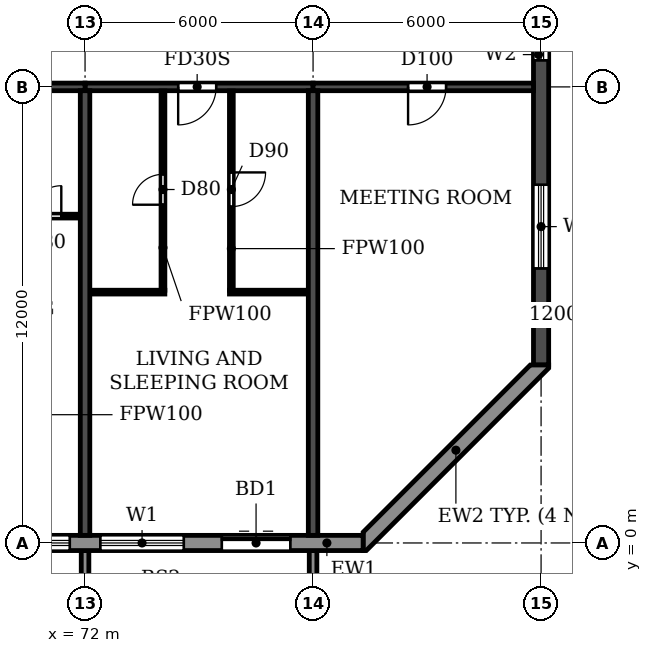
"""IFC4 building model, lengths in metres.
Left out: names, types, materials, properties, quantities, classifications, styles, units other than length and angle.
Written with IfcOpenShell. Run it as: python <this file> out.ifc"""

import sys

from ifc_helpers import new_model, si_unit, direction, frame, frame_2d, origin, place, context, subcontext, project, spatial, polyline, rectangle, outline, extrude, source, transform, mapped, element, fill, save


model = new_model("IFC4")
c1 = context("Model", 3, precision=1e-05, world=origin(), true_north=direction((0.0, 1.0)))
c2 = subcontext(c1, "Body", "Model", "MODEL_VIEW")
j1 = project(units=[si_unit("LENGTHUNIT", "METRE"), si_unit("PLANEANGLEUNIT", "RADIAN")], contexts=[c1])
p1 = place(None, origin())
s1 = spatial("IfcSite", under=j1, at=p1, CompositionType="ELEMENT")
p2 = place(p1, origin())
s2 = spatial("IfcBuilding", under=s1, at=p2, CompositionType="ELEMENT")
p3 = place(p2, frame((0.0, 0.0, 251.1)))
s3 = spatial("IfcBuildingStorey", under=s2, at=p3, CompositionType="ELEMENT", Elevation=251.1)
for number, where, z_axis, x_axis in (
    (1, (72.0, 0.2, 0.0), (0.0, 0.0, 1.0), (0.0, 1.0, 0.0)),
    (2, (78.0, 0.2, 0.0), (0.0, 0.0, 1.0), (0.0, 1.0, 0.0)),
):
    element("IfcWall", number, at=place(p3, frame(where, z_axis=z_axis, x_axis=x_axis)), inside=s3, PredefinedType="SHEAR", context=c2, shape_type="SweptSolid", body=[
        extrude(rectangle(XDim=11.7, YDim=0.25, at=frame_2d((5.85, 0.0))), origin(), (0.0, 0.0, 1.0), 3.08),
    ])
p4 = place(p3, frame((84.0, 4.683, 0.0), z_axis=(0.0, 0.0, 1.0), x_axis=(0.0, 1.0, 0.0)))
e3 = element("IfcWall", 3, at=p4, inside=s3, PredefinedType="SHEAR", context=c2, shape_type="SweptSolid", body=[
    extrude(rectangle(XDim=31.834, YDim=0.4, at=frame_2d((15.917, 0.0))), origin(), (0.0, 0.0, 1.0), 3.08),
])
p5 = place(p4, frame((23.817, 0.0, 0.9)))
e4 = element("IfcOpeningElement", 4, at=p5, cuts=e3, PredefinedType="OPENING", context=c2, shape_type="SweptSolid", body=[
    extrude(rectangle(XDim=1.2, YDim=1.5, at=frame_2d((0.6, 0.75))), frame((0.0, 0.21, 0.0), z_axis=(0.0, -1.0, 0.0), x_axis=(1.0, 0.0, 0.0)), (0.0, 0.0, 1.0), 0.42),
])
p6 = place(p4, frame((8.017, 0.0, 0.9)))
e5 = element("IfcOpeningElement", 5, at=p6, cuts=e3, PredefinedType="OPENING", context=c2, shape_type="SweptSolid", body=[
    extrude(rectangle(XDim=1.2, YDim=1.5, at=frame_2d((0.6, 0.75))), frame((0.0, 0.21, 0.0), z_axis=(0.0, -1.0, 0.0), x_axis=(1.0, 0.0, 0.0)), (0.0, 0.0, 1.0), 0.42),
])
p7 = place(p4, frame((27.694, 0.0, 0.6)))
e6 = element("IfcOpeningElement", 6, at=p7, cuts=e3, PredefinedType="OPENING", context=c2, shape_type="SweptSolid", body=[
    extrude(rectangle(XDim=2.2, YDim=1.8, at=frame_2d((1.1, 0.9))), frame((0.0, 0.21, 0.0), z_axis=(0.0, -1.0, 0.0), x_axis=(1.0, 0.0, 0.0)), (0.0, 0.0, 1.0), 0.42),
])
p8 = place(p4, frame((2.541, 0.0, 0.6)))
e7 = element("IfcOpeningElement", 7, at=p8, cuts=e3, PredefinedType="OPENING", context=c2, shape_type="SweptSolid", body=[
    extrude(rectangle(XDim=2.2, YDim=1.8, at=frame_2d((1.1, 0.9))), frame((0.0, 0.21, 0.0), z_axis=(0.0, -1.0, 0.0), x_axis=(1.0, 0.0, 0.0)), (0.0, 0.0, 1.0), 0.42),
])
p9 = place(p4, frame((15.917, 0.0, 0.9)))
e8 = element("IfcOpeningElement", 8, at=p9, cuts=e3, PredefinedType="OPENING", context=c2, shape_type="SweptSolid", body=[
    extrude(rectangle(XDim=1.2, YDim=1.5, at=frame_2d((0.6, 0.75))), frame((0.0, 0.21, 0.0), z_axis=(0.0, -1.0, 0.0), x_axis=(1.0, 0.0, 0.0)), (0.0, 0.0, 1.0), 0.42),
])
p10 = place(p3, frame((66.0, 12.0, 0.0), z_axis=(0.0, 0.0, 1.0), x_axis=(1.0, 0.0, 0.0)))
e9 = element("IfcWall", 9, at=p10, inside=s3, PredefinedType="SHEAR", context=c2, shape_type="SweptSolid", body=[
    extrude(rectangle(XDim=6.0, YDim=0.2, at=frame_2d((3.0, 0.0))), origin(), (0.0, 0.0, 1.0), 2.48),
])
p11 = place(p10, frame((2.55, 0.0, 0.0)))
e10 = element("IfcOpeningElement", 10, at=p11, cuts=e9, PredefinedType="OPENING", context=c2, shape_type="SweptSolid", body=[
    extrude(rectangle(XDim=1.0, YDim=2.1, at=frame_2d((0.5, 1.05))), frame((0.0, 0.11, 0.0), z_axis=(0.0, -1.0, 0.0), x_axis=(1.0, 0.0, 0.0)), (0.0, 0.0, 1.0), 0.22),
])
p12 = place(p3, frame((72.0, 12.0, 0.0), z_axis=(0.0, 0.0, 1.0), x_axis=(1.0, 0.0, 0.0)))
e11 = element("IfcWall", 11, at=p12, inside=s3, PredefinedType="SHEAR", context=c2, shape_type="SweptSolid", body=[
    extrude(rectangle(XDim=6.0, YDim=0.2, at=frame_2d((3.0, 0.0))), origin(), (0.0, 0.0, 1.0), 2.48),
])
p13 = place(p12, frame((2.45, 0.0, 0.0)))
e12 = element("IfcOpeningElement", 12, at=p13, cuts=e11, PredefinedType="OPENING", context=c2, shape_type="SweptSolid", body=[
    extrude(rectangle(XDim=1.0, YDim=2.1, at=frame_2d((0.5, 1.05))), frame((0.0, 0.11, 0.0), z_axis=(0.0, -1.0, 0.0), x_axis=(1.0, 0.0, 0.0)), (0.0, 0.0, 1.0), 0.22),
])
p14 = place(p3, frame((78.0, 12.0, 0.0), z_axis=(0.0, 0.0, 1.0), x_axis=(1.0, 0.0, 0.0)))
e13 = element("IfcWall", 13, at=p14, inside=s3, PredefinedType="SHEAR", context=c2, shape_type="SweptSolid", body=[
    extrude(rectangle(XDim=5.8, YDim=0.2, at=frame_2d((2.9, 0.0))), origin(), (0.0, 0.0, 1.0), 2.48),
])
p15 = place(p14, frame((2.5, 0.0, 0.0)))
e14 = element("IfcOpeningElement", 14, at=p15, cuts=e13, PredefinedType="OPENING", context=c2, shape_type="SweptSolid", body=[
    extrude(rectangle(XDim=1.0, YDim=2.1, at=frame_2d((0.5, 1.05))), frame((0.0, 0.11, 0.0), z_axis=(0.0, -1.0, 0.0), x_axis=(1.0, 0.0, 0.0)), (0.0, 0.0, 1.0), 0.22),
])
p16 = place(p3, frame((22.683, 0.0, 0.0), z_axis=(0.0, 0.0, 1.0), x_axis=(1.0, 0.0, 0.0)))
e15 = element("IfcWall", 15, at=p16, inside=s3, PredefinedType="STANDARD", context=c2, shape_type="SweptSolid", body=[
    extrude(rectangle(XDim=56.634, YDim=0.4, at=frame_2d((28.317, 0.0))), origin(), (0.0, 0.0, 1.0), 3.08),
])
p17 = place(p16, frame((1.717, 0.0, 0.9)))
e16 = element("IfcOpeningElement", 16, at=p17, cuts=e15, PredefinedType="OPENING", context=c2, shape_type="SweptSolid", body=[
    extrude(rectangle(XDim=2.2, YDim=1.5, at=frame_2d((1.1, 0.75))), frame((0.0, 0.21, 0.0), z_axis=(0.0, -1.0, 0.0), x_axis=(1.0, 0.0, 0.0)), (0.0, 0.0, 1.0), 0.42),
])
p18 = place(p16, frame((4.917, 0.0, 0.0)))
e17 = element("IfcOpeningElement", 17, at=p18, cuts=e15, PredefinedType="OPENING", context=c2, shape_type="SweptSolid", body=[
    extrude(rectangle(XDim=1.8, YDim=2.4, at=frame_2d((0.9, 1.2))), frame((0.0, 0.21, 0.0), z_axis=(0.0, -1.0, 0.0), x_axis=(1.0, 0.0, 0.0)), (0.0, 0.0, 1.0), 0.42),
])
p19 = place(p16, frame((7.717, 0.0, 0.9)))
e18 = element("IfcOpeningElement", 18, at=p19, cuts=e15, PredefinedType="OPENING", context=c2, shape_type="SweptSolid", body=[
    extrude(rectangle(XDim=2.2, YDim=1.5, at=frame_2d((1.1, 0.75))), frame((0.0, 0.21, 0.0), z_axis=(0.0, -1.0, 0.0), x_axis=(1.0, 0.0, 0.0)), (0.0, 0.0, 1.0), 0.42),
])
p20 = place(p16, frame((10.717, 0.0, 0.9)))
e19 = element("IfcOpeningElement", 19, at=p20, cuts=e15, PredefinedType="OPENING", context=c2, shape_type="SweptSolid", body=[
    extrude(rectangle(XDim=2.2, YDim=1.5, at=frame_2d((1.1, 0.75))), frame((0.0, 0.21, 0.0), z_axis=(0.0, -1.0, 0.0), x_axis=(1.0, 0.0, 0.0)), (0.0, 0.0, 1.0), 0.42),
])
p21 = place(p16, frame((13.717, 0.0, 0.9)))
e20 = element("IfcOpeningElement", 20, at=p21, cuts=e15, PredefinedType="OPENING", context=c2, shape_type="SweptSolid", body=[
    extrude(rectangle(XDim=2.2, YDim=1.5, at=frame_2d((1.1, 0.75))), frame((0.0, 0.21, 0.0), z_axis=(0.0, -1.0, 0.0), x_axis=(1.0, 0.0, 0.0)), (0.0, 0.0, 1.0), 0.42),
])
p22 = place(p16, frame((16.917, 0.0, 0.0)))
e21 = element("IfcOpeningElement", 21, at=p22, cuts=e15, PredefinedType="OPENING", context=c2, shape_type="SweptSolid", body=[
    extrude(rectangle(XDim=1.8, YDim=2.4, at=frame_2d((0.9, 1.2))), frame((0.0, 0.21, 0.0), z_axis=(0.0, -1.0, 0.0), x_axis=(1.0, 0.0, 0.0)), (0.0, 0.0, 1.0), 0.42),
])
p23 = place(p16, frame((19.717, 0.0, 0.9)))
e22 = element("IfcOpeningElement", 22, at=p23, cuts=e15, PredefinedType="OPENING", context=c2, shape_type="SweptSolid", body=[
    extrude(rectangle(XDim=2.2, YDim=1.5, at=frame_2d((1.1, 0.75))), frame((0.0, 0.21, 0.0), z_axis=(0.0, -1.0, 0.0), x_axis=(1.0, 0.0, 0.0)), (0.0, 0.0, 1.0), 0.42),
])
p24 = place(p16, frame((22.717, 0.0, 0.9)))
e23 = element("IfcOpeningElement", 23, at=p24, cuts=e15, PredefinedType="OPENING", context=c2, shape_type="SweptSolid", body=[
    extrude(rectangle(XDim=2.2, YDim=1.5, at=frame_2d((1.1, 0.75))), frame((0.0, 0.21, 0.0), z_axis=(0.0, -1.0, 0.0), x_axis=(1.0, 0.0, 0.0)), (0.0, 0.0, 1.0), 0.42),
])
p25 = place(p16, frame((25.717, 0.0, 0.9)))
e24 = element("IfcOpeningElement", 24, at=p25, cuts=e15, PredefinedType="OPENING", context=c2, shape_type="SweptSolid", body=[
    extrude(rectangle(XDim=2.2, YDim=1.5, at=frame_2d((1.1, 0.75))), frame((0.0, 0.21, 0.0), z_axis=(0.0, -1.0, 0.0), x_axis=(1.0, 0.0, 0.0)), (0.0, 0.0, 1.0), 0.42),
])
p26 = place(p16, frame((28.917, 0.0, 0.0)))
e25 = element("IfcOpeningElement", 25, at=p26, cuts=e15, PredefinedType="OPENING", context=c2, shape_type="SweptSolid", body=[
    extrude(rectangle(XDim=1.8, YDim=2.4, at=frame_2d((0.9, 1.2))), frame((0.0, 0.21, 0.0), z_axis=(0.0, -1.0, 0.0), x_axis=(1.0, 0.0, 0.0)), (0.0, 0.0, 1.0), 0.42),
])
p27 = place(p16, frame((31.717, 0.0, 0.9)))
e26 = element("IfcOpeningElement", 26, at=p27, cuts=e15, PredefinedType="OPENING", context=c2, shape_type="SweptSolid", body=[
    extrude(rectangle(XDim=2.2, YDim=1.5, at=frame_2d((1.1, 0.75))), frame((0.0, 0.21, 0.0), z_axis=(0.0, -1.0, 0.0), x_axis=(1.0, 0.0, 0.0)), (0.0, 0.0, 1.0), 0.42),
])
p28 = place(p16, frame((34.717, 0.0, 0.9)))
e27 = element("IfcOpeningElement", 27, at=p28, cuts=e15, PredefinedType="OPENING", context=c2, shape_type="SweptSolid", body=[
    extrude(rectangle(XDim=2.2, YDim=1.5, at=frame_2d((1.1, 0.75))), frame((0.0, 0.21, 0.0), z_axis=(0.0, -1.0, 0.0), x_axis=(1.0, 0.0, 0.0)), (0.0, 0.0, 1.0), 0.42),
])
p29 = place(p16, frame((37.717, 0.0, 0.9)))
e28 = element("IfcOpeningElement", 28, at=p29, cuts=e15, PredefinedType="OPENING", context=c2, shape_type="SweptSolid", body=[
    extrude(rectangle(XDim=2.2, YDim=1.5, at=frame_2d((1.1, 0.75))), frame((0.0, 0.21, 0.0), z_axis=(0.0, -1.0, 0.0), x_axis=(1.0, 0.0, 0.0)), (0.0, 0.0, 1.0), 0.42),
])
p30 = place(p16, frame((40.917, 0.0, 0.0)))
e29 = element("IfcOpeningElement", 29, at=p30, cuts=e15, PredefinedType="OPENING", context=c2, shape_type="SweptSolid", body=[
    extrude(rectangle(XDim=1.8, YDim=2.4, at=frame_2d((0.9, 1.2))), frame((0.0, 0.21, 0.0), z_axis=(0.0, -1.0, 0.0), x_axis=(1.0, 0.0, 0.0)), (0.0, 0.0, 1.0), 0.42),
])
p31 = place(p16, frame((43.717, 0.0, 0.9)))
e30 = element("IfcOpeningElement", 30, at=p31, cuts=e15, PredefinedType="OPENING", context=c2, shape_type="SweptSolid", body=[
    extrude(rectangle(XDim=2.2, YDim=1.5, at=frame_2d((1.1, 0.75))), frame((0.0, 0.21, 0.0), z_axis=(0.0, -1.0, 0.0), x_axis=(1.0, 0.0, 0.0)), (0.0, 0.0, 1.0), 0.42),
])
p32 = place(p16, frame((46.717, 0.0, 0.9)))
e31 = element("IfcOpeningElement", 31, at=p32, cuts=e15, PredefinedType="OPENING", context=c2, shape_type="SweptSolid", body=[
    extrude(rectangle(XDim=2.2, YDim=1.5, at=frame_2d((1.1, 0.75))), frame((0.0, 0.21, 0.0), z_axis=(0.0, -1.0, 0.0), x_axis=(1.0, 0.0, 0.0)), (0.0, 0.0, 1.0), 0.42),
])
p33 = place(p16, frame((49.717, 0.0, 0.9)))
e32 = element("IfcOpeningElement", 32, at=p33, cuts=e15, PredefinedType="OPENING", context=c2, shape_type="SweptSolid", body=[
    extrude(rectangle(XDim=2.2, YDim=1.5, at=frame_2d((1.1, 0.75))), frame((0.0, 0.21, 0.0), z_axis=(0.0, -1.0, 0.0), x_axis=(1.0, 0.0, 0.0)), (0.0, 0.0, 1.0), 0.42),
])
p34 = place(p16, frame((52.917, 0.0, 0.0)))
e33 = element("IfcOpeningElement", 33, at=p34, cuts=e15, PredefinedType="OPENING", context=c2, shape_type="SweptSolid", body=[
    extrude(rectangle(XDim=1.8, YDim=2.4, at=frame_2d((0.9, 1.2))), frame((0.0, 0.21, 0.0), z_axis=(0.0, -1.0, 0.0), x_axis=(1.0, 0.0, 0.0)), (0.0, 0.0, 1.0), 0.42),
])
p35 = place(p3, origin())
e34 = element("IfcWall", 34, at=p35, inside=s3, PredefinedType="STANDARD", context=c2, shape_type="SweptSolid", body=[
    extrude(outline(polyline([(79.317, -0.2), (79.4, -0.2), (84.2, 4.6), (84.2, 4.683), (83.717, 4.683), (79.317, 0.283), (79.317, -0.2)])), origin(), (0.0, 0.0, 1.0), 3.08),
])
m1 = source(origin(), c2, "Body", "SweptSolid", [
    extrude(outline(polyline([(0.0, 0.0), (0.2, 0.0), (0.2, 1.65), (0.0, 1.65), (0.0, 0.0)])), origin(), (0.0, 0.0, 1.0), 3.1),
])
for number, where in (
    (35, (71.9, -1.85, 0.0)),
    (36, (77.9, -1.85, 0.0)),
):
    element("IfcWall", number, at=place(p3, frame(where)), inside=s3, PredefinedType="STANDARD", context=c2, shape_type="MappedRepresentation", body=[
        mapped(m1, transform((0.0, 0.0, 0.0))),
    ])
p36 = place(p3, frame((72.135, 6.6, 0.0), z_axis=(0.0, 0.0, 1.0), x_axis=(1.0, 0.0, 0.0)))
e37 = element("IfcWall", 37, at=p36, inside=s3, PredefinedType="PARTITIONING", context=c2, shape_type="SweptSolid", body=[
    extrude(rectangle(XDim=1.965, YDim=0.1, at=frame_2d((0.982, 0.0))), origin(), (0.0, 0.0, 1.0), 3.08),
])
p37 = place(p3, frame((75.8, 6.6, 0.0), z_axis=(0.0, 0.0, 1.0), x_axis=(1.0, 0.0, 0.0)))
e38 = element("IfcWall", 38, at=p37, inside=s3, PredefinedType="PARTITIONING", context=c2, shape_type="SweptSolid", body=[
    extrude(rectangle(XDim=2.065, YDim=0.1, at=frame_2d((1.032, 0.0))), origin(), (0.0, 0.0, 1.0), 3.08),
])
p38 = place(p3, frame((69.9, 8.6, 0.0), z_axis=(0.0, 0.0, 1.0), x_axis=(1.0, 0.0, 0.0)))
e39 = element("IfcWall", 39, at=p38, inside=s3, PredefinedType="PARTITIONING", context=c2, shape_type="SweptSolid", body=[
    extrude(rectangle(XDim=1.965, YDim=0.1, at=frame_2d((0.982, 0.0))), origin(), (0.0, 0.0, 1.0), 3.08),
])
p39 = place(p38, frame((0.675, 0.0, 0.0)))
e40 = element("IfcOpeningElement", 40, at=p39, cuts=e39, PredefinedType="OPENING", context=c2, shape_type="SweptSolid", body=[
    extrude(rectangle(XDim=0.8, YDim=2.1, at=frame_2d((0.4, 1.05))), frame((0.0, 0.06, 0.0), z_axis=(0.0, -1.0, 0.0), x_axis=(1.0, 0.0, 0.0)), (0.0, 0.0, 1.0), 0.12),
])
p40 = place(p3, frame((74.05, 6.65, 0.0), z_axis=(0.0, 0.0, 1.0), x_axis=(0.0, 1.0, 0.0)))
e41 = element("IfcWall", 41, at=p40, inside=s3, PredefinedType="PARTITIONING", context=c2, shape_type="SweptSolid", body=[
    extrude(rectangle(XDim=5.24, YDim=0.1, at=frame_2d((2.62, 0.0))), origin(), (0.0, 0.0, 1.0), 3.08),
])
p41 = place(p40, frame((2.25, 0.0, 0.0)))
e42 = element("IfcOpeningElement", 42, at=p41, cuts=e41, PredefinedType="OPENING", context=c2, shape_type="SweptSolid", body=[
    extrude(rectangle(XDim=0.8, YDim=2.1, at=frame_2d((0.4, 1.05))), frame((0.0, 0.06, 0.0), z_axis=(0.0, -1.0, 0.0), x_axis=(1.0, 0.0, 0.0)), (0.0, 0.0, 1.0), 0.12),
])
p42 = place(p3, frame((75.85, 6.65, 0.0), z_axis=(0.0, 0.0, 1.0), x_axis=(0.0, 1.0, 0.0)))
e43 = element("IfcWall", 43, at=p42, inside=s3, PredefinedType="PARTITIONING", context=c2, shape_type="SweptSolid", body=[
    extrude(rectangle(XDim=5.24, YDim=0.1, at=frame_2d((2.62, 0.0))), origin(), (0.0, 0.0, 1.0), 3.08),
])
p43 = place(p42, frame((2.2, 0.0, 0.0)))
e44 = element("IfcOpeningElement", 44, at=p43, cuts=e43, PredefinedType="OPENING", context=c2, shape_type="SweptSolid", body=[
    extrude(rectangle(XDim=0.9, YDim=2.1, at=frame_2d((0.45, 1.05))), frame((0.0, 0.06, 0.0), z_axis=(0.0, -1.0, 0.0), x_axis=(1.0, 0.0, 0.0)), (0.0, 0.0, 1.0), 0.12),
])
p44 = place(p32, origin())
e45 = element("IfcWindow", 45, at=p44, inside=s3, PartitioningType="DOUBLE_PANEL_HORIZONTAL", PredefinedType="WINDOW", context=c2, shape_type="SweptSolid", body=[
    extrude(rectangle(XDim=2.2, YDim=1.5, at=frame_2d((1.1, 0.75))), frame((0.0, 0.03, 0.0), z_axis=(0.0, -1.0, 0.0), x_axis=(1.0, 0.0, 0.0)), (0.0, 0.0, 1.0), 0.06),
])
fill(e31, e45)
p45 = place(p33, origin())
e46 = element("IfcWindow", 46, at=p45, inside=s3, PartitioningType="DOUBLE_PANEL_HORIZONTAL", PredefinedType="WINDOW", context=c2, shape_type="SweptSolid", body=[
    extrude(rectangle(XDim=2.2, YDim=1.5, at=frame_2d((1.1, 0.75))), frame((0.0, 0.03, 0.0), z_axis=(0.0, -1.0, 0.0), x_axis=(1.0, 0.0, 0.0)), (0.0, 0.0, 1.0), 0.06),
])
fill(e32, e46)
p46 = place(p34, origin())
e47 = element("IfcDoor", 47, at=p46, inside=s3, OperationType="DOUBLE_DOOR_SLIDING", PredefinedType="DOOR", context=c2, shape_type="SweptSolid", body=[
    extrude(rectangle(XDim=1.8, YDim=2.4, at=frame_2d((0.9, 1.2))), frame((0.0, 0.025, 0.0), z_axis=(0.0, -1.0, 0.0), x_axis=(1.0, 0.0, 0.0)), (0.0, 0.0, 1.0), 0.05),
])
fill(e33, e47)
p47 = place(p6, origin())
e48 = element("IfcWindow", 48, at=p47, inside=s3, PartitioningType="SINGLE_PANEL", PredefinedType="WINDOW", context=c2, shape_type="SweptSolid", body=[
    extrude(rectangle(XDim=1.2, YDim=1.5, at=frame_2d((0.6, 0.75))), frame((0.0, 0.03, 0.0), z_axis=(0.0, -1.0, 0.0), x_axis=(1.0, 0.0, 0.0)), (0.0, 0.0, 1.0), 0.06),
])
fill(e5, e48)
p48 = place(p8, origin())
e49 = element("IfcWindow", 49, at=p48, inside=s3, PartitioningType="DOUBLE_PANEL_HORIZONTAL", PredefinedType="WINDOW", context=c2, shape_type="SweptSolid", body=[
    extrude(rectangle(XDim=2.2, YDim=1.8, at=frame_2d((1.1, 0.9))), frame((0.0, 0.03, 0.0), z_axis=(0.0, -1.0, 0.0), x_axis=(1.0, 0.0, 0.0)), (0.0, 0.0, 1.0), 0.06),
])
fill(e7, e49)
p49 = place(p39, origin())
e50 = element("IfcDoor", 50, at=p49, inside=s3, OperationType="SINGLE_SWING_RIGHT", PredefinedType="DOOR", context=c2, shape_type="SweptSolid", body=[
    extrude(rectangle(XDim=0.8, YDim=2.1, at=frame_2d((0.4, 1.05))), frame((0.0, 0.025, 0.0), z_axis=(0.0, -1.0, 0.0), x_axis=(1.0, 0.0, 0.0)), (0.0, 0.0, 1.0), 0.05),
])
fill(e40, e50)
p50 = place(p41, origin())
e51 = element("IfcDoor", 51, at=p50, inside=s3, OperationType="SINGLE_SWING_LEFT", PredefinedType="DOOR", context=c2, shape_type="SweptSolid", body=[
    extrude(rectangle(XDim=0.8, YDim=2.1, at=frame_2d((0.4, 1.05))), frame((0.0, 0.025, 0.0), z_axis=(0.0, -1.0, 0.0), x_axis=(1.0, 0.0, 0.0)), (0.0, 0.0, 1.0), 0.05),
])
fill(e42, e51)
p51 = place(p13, frame((1.0, 0.0, 0.0), z_axis=(0.0, 0.0, 1.0), x_axis=(-1.0, 0.0, 0.0)))
e52 = element("IfcDoor", 52, at=p51, inside=s3, OperationType="SINGLE_SWING_RIGHT", PredefinedType="DOOR", context=c2, shape_type="SweptSolid", body=[
    extrude(rectangle(XDim=1.0, YDim=2.1, at=frame_2d((0.5, 1.05))), frame((0.0, 0.025, 0.0), z_axis=(0.0, -1.0, 0.0), x_axis=(1.0, 0.0, 0.0)), (0.0, 0.0, 1.0), 0.05),
])
fill(e12, e52)
p52 = place(p43, frame((0.9, 0.0, 0.0), z_axis=(0.0, 0.0, 1.0), x_axis=(-1.0, 0.0, 0.0)))
e53 = element("IfcDoor", 53, at=p52, inside=s3, OperationType="SINGLE_SWING_LEFT", PredefinedType="DOOR", context=c2, shape_type="SweptSolid", body=[
    extrude(rectangle(XDim=0.9, YDim=2.1, at=frame_2d((0.45, 1.05))), frame((0.0, 0.025, 0.0), z_axis=(0.0, -1.0, 0.0), x_axis=(1.0, 0.0, 0.0)), (0.0, 0.0, 1.0), 0.05),
])
fill(e44, e53)
p53 = place(p15, frame((1.0, 0.0, 0.0), z_axis=(0.0, 0.0, 1.0), x_axis=(-1.0, 0.0, 0.0)))
e54 = element("IfcDoor", 54, at=p53, inside=s3, OperationType="SINGLE_SWING_RIGHT", PredefinedType="DOOR", context=c2, shape_type="SweptSolid", body=[
    extrude(rectangle(XDim=1.0, YDim=2.1, at=frame_2d((0.5, 1.05))), frame((0.0, 0.025, 0.0), z_axis=(0.0, -1.0, 0.0), x_axis=(1.0, 0.0, 0.0)), (0.0, 0.0, 1.0), 0.05),
])
fill(e14, e54)
save(model, sys.argv[1])
